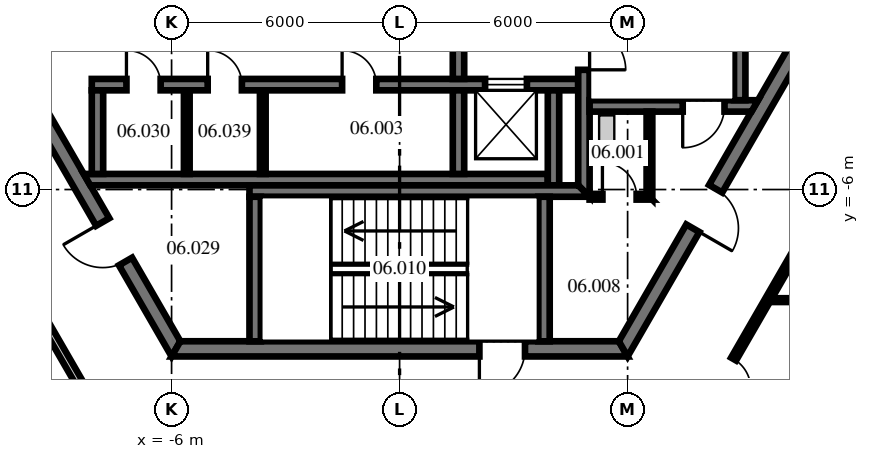
"""IFC4 building model, lengths in metres.
Left out: names, types, materials, properties, quantities, classifications, styles, units other than length and angle.
Written with IfcOpenShell. Run it as: python <this file> out.ifc"""

import sys

from ifc_helpers import new_model, si_unit, direction, frame, frame_2d, origin, place, context, subcontext, project, spatial, polyline, rectangle, outline, extrude, source, transform, mapped, element, fill, save


model = new_model("IFC4")
c1 = context("Model", 3, precision=1e-05, world=origin(), true_north=direction((0.0, 1.0)))
c2 = subcontext(c1, "Body", "Model", "MODEL_VIEW")
j1 = project(units=[si_unit("LENGTHUNIT", "METRE"), si_unit("PLANEANGLEUNIT", "RADIAN")], contexts=[c1])
p1 = place(None, origin())
s1 = spatial("IfcSite", under=j1, at=p1, CompositionType="ELEMENT")
p2 = place(p1, origin())
s2 = spatial("IfcBuilding", under=s1, at=p2, CompositionType="ELEMENT")
p3 = place(p2, frame((0.0, 0.0, 28.9)))
s3 = spatial("IfcBuildingStorey", under=s2, at=p3, CompositionType="ELEMENT", Elevation=28.9)
m1 = source(origin(), c2, "Body", "SweptSolid", [
    extrude(outline(polyline([(-0.115, -0.2), (11.885, -0.2), (11.654, 0.2), (0.115, 0.2), (-0.115, -0.2)])), origin(), (0.0, 0.0, 1.0), 4.1),
])
p4 = place(p3, frame((-11.769, 0.0, 0.0), z_axis=(0.0, 0.0, 1.0), x_axis=(0.499996592174, -0.866027371285, 0.0)))
e1 = element("IfcWall", 1, at=p4, inside=s3, PredefinedType="SHEAR", context=c2, shape_type="MappedRepresentation", body=[
    mapped(m1, transform((0.0, 0.0, 0.0), scale=1.0)),
])
p5 = place(p4, frame((1.405, 0.0, 0.0)))
e2 = element("IfcOpeningElement", 2, at=p5, cuts=e1, PredefinedType="OPENING", context=c2, shape_type="SweptSolid", body=[
    extrude(rectangle(XDim=1.8, YDim=2.1, at=frame_2d((0.9, 1.05))), frame((0.0, 0.21, 0.0), z_axis=(0.0, -1.0, 0.0), x_axis=(1.0, 0.0, 0.0)), (0.0, 0.0, 1.0), 0.42),
])
p6 = place(p4, frame((7.915, 0.0, 0.0)))
e3 = element("IfcOpeningElement", 3, at=p6, cuts=e1, PredefinedType="OPENING", context=c2, shape_type="SweptSolid", body=[
    extrude(rectangle(XDim=1.2, YDim=2.1, at=frame_2d((0.6, 1.05))), frame((0.0, 0.21, 0.0), z_axis=(0.0, -1.0, 0.0), x_axis=(1.0, 0.0, 0.0)), (0.0, 0.0, 1.0), 0.42),
])
p7 = place(p3, frame((-5.885, -10.192, 0.0), z_axis=(0.0, 0.0, 1.0), x_axis=(1.0, 0.0, 0.0)))
e4 = element("IfcWall", 4, at=p7, inside=s3, PredefinedType="SHEAR", context=c2, shape_type="MappedRepresentation", body=[
    mapped(m1, transform((0.0, 0.0, 0.0), scale=1.0)),
])
p8 = place(p7, frame((7.985, 0.0, 0.0)))
e5 = element("IfcOpeningElement", 5, at=p8, cuts=e4, PredefinedType="OPENING", context=c2, shape_type="SweptSolid", body=[
    extrude(rectangle(XDim=1.2, YDim=2.1, at=frame_2d((0.6, 1.05))), frame((0.0, 0.21, 0.0), z_axis=(0.0, -1.0, 0.0), x_axis=(1.0, 0.0, 0.0)), (0.0, 0.0, 1.0), 0.42),
])
p9 = place(p3, frame((5.885, -10.192, 0.0), z_axis=(0.0, 0.0, 1.0), x_axis=(0.499996592174, 0.866027371285, 0.0)))
e6 = element("IfcWall", 6, at=p9, inside=s3, PredefinedType="SHEAR", context=c2, shape_type="MappedRepresentation", body=[
    mapped(m1, transform((0.0, 0.0, 0.0), scale=1.0)),
])
p10 = place(p9, frame((3.665, 0.0, 0.0)))
e7 = element("IfcOpeningElement", 7, at=p10, cuts=e6, PredefinedType="OPENING", context=c2, shape_type="SweptSolid", body=[
    extrude(rectangle(XDim=1.2, YDim=2.1, at=frame_2d((0.6, 1.05))), frame((0.0, 0.21, 0.0), z_axis=(0.0, -1.0, 0.0), x_axis=(1.0, 0.0, 0.0)), (0.0, 0.0, 1.0), 0.42),
])
m2 = source(origin(), c2, "Body", "SweptSolid", [
    extrude(rectangle(XDim=12.8, YDim=0.3, at=frame_2d((6.4, 0.0))), origin(), (0.0, 0.0, 1.0), 4.1),
])
p11 = place(p3, frame((-8.1, -3.24, 0.0), z_axis=(0.0, 0.0, 1.0), x_axis=(1.0, 0.0, 0.0)))
e8 = element("IfcWall", 8, at=p11, inside=s3, PredefinedType="SHEAR", context=c2, shape_type="MappedRepresentation", body=[
    mapped(m2, transform((0.0, 0.0, 0.0), scale=1.0)),
])
p12 = place(p11, frame((0.913, 0.0, 0.0)))
e9 = element("IfcOpeningElement", 9, at=p12, cuts=e8, PredefinedType="OPENING", context=c2, shape_type="SweptSolid", body=[
    extrude(rectangle(XDim=0.9, YDim=2.1, at=frame_2d((0.45, 1.05))), frame((0.0, 0.16, 0.0), z_axis=(0.0, -1.0, 0.0), x_axis=(1.0, 0.0, 0.0)), (0.0, 0.0, 1.0), 0.32),
])
p13 = place(p11, frame((3.05, 0.0, 0.0)))
e10 = element("IfcOpeningElement", 10, at=p13, cuts=e8, PredefinedType="OPENING", context=c2, shape_type="SweptSolid", body=[
    extrude(rectangle(XDim=0.9, YDim=2.1, at=frame_2d((0.45, 1.05))), frame((0.0, 0.16, 0.0), z_axis=(0.0, -1.0, 0.0), x_axis=(1.0, 0.0, 0.0)), (0.0, 0.0, 1.0), 0.32),
])
p14 = place(p11, frame((6.587, 0.0, 0.0)))
e11 = element("IfcOpeningElement", 11, at=p14, cuts=e8, PredefinedType="OPENING", context=c2, shape_type="SweptSolid", body=[
    extrude(rectangle(XDim=0.9, YDim=2.1, at=frame_2d((0.45, 1.05))), frame((0.0, 0.16, 0.0), z_axis=(0.0, -1.0, 0.0), x_axis=(1.0, 0.0, 0.0)), (0.0, 0.0, 1.0), 0.32),
])
p15 = place(p11, frame((10.35, 0.0, 0.0)))
e12 = element("IfcOpeningElement", 12, at=p15, cuts=e8, PredefinedType="OPENING", context=c2, shape_type="SweptSolid", body=[
    extrude(rectangle(XDim=1.1, YDim=2.1, at=frame_2d((0.55, 1.05))), frame((0.0, 0.16, 0.0), z_axis=(0.0, -1.0, 0.0), x_axis=(1.0, 0.0, 0.0)), (0.0, 0.0, 1.0), 0.32),
])
m3 = source(origin(), c2, "Body", "SweptSolid", [
    extrude(outline(polyline([(12.0, -0.15), (-0.04, -0.15), (-0.213, 0.15), (12.0, 0.15), (12.0, -0.15)])), origin(), (0.0, 0.0, 1.0), 4.1),
])
p16 = place(p3, frame((-8.1, -5.74, 0.0), z_axis=(0.0, 0.0, 1.0), x_axis=(1.0, 0.0, 0.0)))
e13 = element("IfcWall", 13, at=p16, inside=s3, PredefinedType="SHEAR", context=c2, shape_type="MappedRepresentation", body=[
    mapped(m3, transform((0.0, 0.0, 0.0), scale=1.0)),
])
m4 = source(origin(), c2, "Body", "SweptSolid", [
    extrude(rectangle(XDim=2.2, YDim=0.3, at=frame_2d((1.1, 0.0))), origin(), (0.0, 0.0, 1.0), 4.1),
])
for number, where, z_axis, x_axis in (
    (14, (-7.95, -5.59, 0.0), (0.0, 0.0, 1.0), (0.0, 1.0, 0.0)),
    (15, (1.55, -5.59, 0.0), (0.0, 0.0, 1.0), (0.0, 1.0, 0.0)),
):
    element("IfcWall", number, at=place(p3, frame(where, z_axis=z_axis, x_axis=x_axis)), inside=s3, PredefinedType="SHEAR", context=c2, shape_type="MappedRepresentation", body=[
        mapped(m4, transform((0.0, 0.0, 0.0), scale=1.0)),
    ])
m5 = source(origin(), c2, "Body", "SweptSolid", [
    extrude(rectangle(XDim=2.5, YDim=0.3, at=frame_2d((1.25, 0.0))), origin(), (0.0, 0.0, 1.0), 4.1),
])
p17 = place(p3, frame((4.05, -5.89, 0.0), z_axis=(0.0, 0.0, 1.0), x_axis=(0.0, 1.0, 0.0)))
e16 = element("IfcWall", 16, at=p17, inside=s3, PredefinedType="SHEAR", context=c2, shape_type="MappedRepresentation", body=[
    mapped(m5, transform((0.0, 0.0, 0.0), scale=1.0)),
])
m6 = source(origin(), c2, "Body", "SweptSolid", [
    extrude(rectangle(XDim=3.0, YDim=0.3, at=frame_2d((1.5, 0.0))), origin(), (0.0, 0.0, 1.0), 4.1),
])
p18 = place(p3, frame((1.55, -3.09, 0.0), z_axis=(0.0, 0.0, 1.0), x_axis=(0.0, 1.0, 0.0)))
e17 = element("IfcWall", 17, at=p18, inside=s3, PredefinedType="SHEAR", context=c2, shape_type="MappedRepresentation", body=[
    mapped(m6, transform((0.0, 0.0, 0.0), scale=1.0)),
])
p19 = place(p18, frame((0.9, 0.0, 0.0)))
e18 = element("IfcOpeningElement", 18, at=p19, cuts=e17, PredefinedType="OPENING", context=c2, shape_type="SweptSolid", body=[
    extrude(rectangle(XDim=1.2, YDim=2.1, at=frame_2d((0.6, 1.05))), frame((0.0, 0.16, 0.0), z_axis=(0.0, -1.0, 0.0), x_axis=(1.0, 0.0, 0.0)), (0.0, 0.0, 1.0), 0.32),
])
m7 = source(origin(), c2, "Body", "SweptSolid", [
    extrude(outline(polyline([(-0.15, -0.15), (9.99, -0.15), (9.99, 0.15), (0.15, 0.15), (-0.15, -0.15)])), origin(), (0.0, 0.0, 1.0), 4.1),
])
p20 = place(p3, frame((4.85, -6.04, 0.0), z_axis=(0.0, 0.0, 1.0), x_axis=(0.0, 1.0, 0.0)))
e19 = element("IfcWall", 19, at=p20, inside=s3, PredefinedType="SHEAR", context=c2, shape_type="MappedRepresentation", body=[
    mapped(m7, transform((0.0, 0.0, 0.0), scale=1.0)),
])
p21 = place(p20, frame((3.19, 0.0, 0.0)))
e20 = element("IfcOpeningElement", 20, at=p21, cuts=e19, PredefinedType="OPENING", context=c2, shape_type="SweptSolid", body=[
    extrude(rectangle(XDim=1.1, YDim=2.1, at=frame_2d((0.55, 1.05))), frame((0.0, 0.16, 0.0), z_axis=(0.0, -1.0, 0.0), x_axis=(1.0, 0.0, 0.0)), (0.0, 0.0, 1.0), 0.32),
])
m8 = source(origin(), c2, "Body", "SweptSolid", [
    extrude(outline(polyline([(0.0, -0.15), (0.0, 0.15), (4.433, 0.15), (4.26, -0.15), (0.0, -0.15)])), origin(), (0.0, 0.0, 1.0), 4.1),
])
p22 = place(p3, frame((5.0, -3.8, 0.0), z_axis=(0.0, 0.0, 1.0), x_axis=(1.0, 0.0, 0.0)))
e21 = element("IfcWall", 21, at=p22, inside=s3, PredefinedType="SHEAR", context=c2, shape_type="MappedRepresentation", body=[
    mapped(m8, transform((0.0, 0.0, 0.0), scale=1.0)),
])
p23 = place(p22, frame((2.45, 0.0, 0.0)))
e22 = element("IfcOpeningElement", 22, at=p23, cuts=e21, PredefinedType="OPENING", context=c2, shape_type="SweptSolid", body=[
    extrude(rectangle(XDim=1.1, YDim=2.1, at=frame_2d((0.55, 1.05))), frame((0.0, 0.16, 0.0), z_axis=(0.0, -1.0, 0.0), x_axis=(1.0, 0.0, 0.0)), (0.0, 0.0, 1.0), 0.32),
])
m9 = source(origin(), c2, "Body", "SweptSolid", [
    extrude(rectangle(XDim=7.3, YDim=0.3, at=frame_2d((3.65, 0.0))), origin(), (0.0, 0.0, 1.0), 4.1),
])
p24 = place(p3, frame((8.95, -3.65, 0.0), z_axis=(0.0, 0.0, 1.0), x_axis=(0.0, 1.0, 0.0)))
e23 = element("IfcWall", 23, at=p24, inside=s3, PredefinedType="SHEAR", context=c2, shape_type="MappedRepresentation", body=[
    mapped(m9, transform((0.0, 0.0, 0.0), scale=1.0)),
])
m10 = source(origin(), c2, "Body", "SweptSolid", [
    extrude(outline(polyline([(0.0, -0.15), (8.95, -0.15), (8.65, 0.15), (0.0, 0.15), (0.0, -0.15)])), origin(), (0.0, 0.0, 1.0), 4.1),
])
p25 = place(p3, frame((-3.95, -6.04, 0.0), z_axis=(0.0, 0.0, 1.0), x_axis=(1.0, 0.0, 0.0)))
e24 = element("IfcWall", 24, at=p25, inside=s3, PredefinedType="SHEAR", context=c2, shape_type="MappedRepresentation", body=[
    mapped(m10, transform((0.0, 0.0, 0.0), scale=1.0)),
])
m11 = source(origin(), c2, "Body", "SweptSolid", [
    extrude(outline(polyline([(3.8, -0.15), (-0.004, -0.15), (-0.004, 0.15), (3.8, 0.15), (3.8, -0.15)])), origin(), (0.0, 0.0, 1.0), 4.1),
])
for number, where, z_axis, x_axis in (
    (25, (-3.8, -9.99, 0.0), (0.0, 0.0, 1.0), (0.0, 1.0, 0.0)),
    (26, (3.8, -9.99, 0.0), (0.0, 0.0, 1.0), (0.0, 1.0, 0.0)),
):
    element("IfcWall", number, at=place(p3, frame(where, z_axis=z_axis, x_axis=x_axis)), inside=s3, PredefinedType="SHEAR", context=c2, shape_type="MappedRepresentation", body=[
        mapped(m11, transform((0.0, 0.0, 0.0), scale=1.0)),
    ])
m12 = source(origin(), c2, "Body", "SweptSolid", [
    extrude(outline(polyline([(0.0, -0.075), (1.65, -0.075), (1.5, 0.075), (0.0, 0.075), (0.0, -0.075)])), origin(), (0.0, 0.0, 1.0), 4.1),
])
p26 = place(p3, frame((5.0, -6.19, 0.0), z_axis=(0.0, 0.0, 1.0), x_axis=(1.0, 0.0, 0.0)))
e27 = element("IfcWall", 27, at=p26, inside=s3, PredefinedType="PARTITIONING", context=c2, shape_type="MappedRepresentation", body=[
    mapped(m12, transform((0.0, 0.0, 0.0), scale=1.0)),
])
p27 = place(p26, frame((0.337, 0.0, 0.0)))
e28 = element("IfcOpeningElement", 28, at=p27, cuts=e27, PredefinedType="OPENING", context=c2, shape_type="SweptSolid", body=[
    extrude(rectangle(XDim=0.9, YDim=2.1, at=frame_2d((0.45, 1.05))), frame((0.0, 0.085, 0.0), z_axis=(0.0, -1.0, 0.0), x_axis=(1.0, 0.0, 0.0)), (0.0, 0.0, 1.0), 0.17),
])
m13 = source(origin(), c2, "Body", "SweptSolid", [
    extrude(outline(polyline([(-0.075, -0.075), (2.24, -0.075), (2.24, 0.075), (0.075, 0.075), (-0.075, -0.075)])), origin(), (0.0, 0.0, 1.0), 4.1),
])
p28 = place(p3, frame((6.575, -6.19, 0.0), z_axis=(0.0, 0.0, 1.0), x_axis=(0.0, 1.0, 0.0)))
e29 = element("IfcWall", 29, at=p28, inside=s3, PredefinedType="PARTITIONING", context=c2, shape_type="MappedRepresentation", body=[
    mapped(m13, transform((0.0, 0.0, 0.0), scale=1.0)),
])
m14 = source(origin(), c2, "Body", "SweptSolid", [
    extrude(rectangle(XDim=2.2, YDim=0.15, at=frame_2d((1.1, 0.0))), origin(), (0.0, 0.0, 1.0), 4.1),
])
for number, where, z_axis, x_axis in (
    (30, (-5.6, -5.59, 0.0), (0.0, 0.0, 1.0), (0.0, 1.0, 0.0)),
    (31, (-3.6, -5.59, 0.0), (0.0, 0.0, 1.0), (0.0, 1.0, 0.0)),
):
    element("IfcWall", number, at=place(p3, frame(where, z_axis=z_axis, x_axis=x_axis)), inside=s3, PredefinedType="PARTITIONING", context=c2, shape_type="MappedRepresentation", body=[
        mapped(m14, transform((0.0, 0.0, 0.0), scale=1.0)),
    ])
m15 = source(origin(), c2, "Body", "SweptSolid", [
    extrude(rectangle(XDim=8.478, YDim=0.2, at=frame_2d((4.239, 0.0))), origin(), (0.0, 0.0, 1.0), 4.1),
])
p29 = place(p3, frame((-11.673, -5.466, 0.0), z_axis=(0.0, 0.0, 1.0), x_axis=(0.499985860718, -0.866033566949, 0.0)))
e32 = element("IfcWall", 32, at=p29, inside=s3, PredefinedType="PARTITIONING", context=c2, shape_type="MappedRepresentation", body=[
    mapped(m15, transform((0.0, 0.0, 0.0), scale=1.0)),
])
m16 = source(origin(), c2, "Body", "SweptSolid", [
    extrude(rectangle(XDim=11.802, YDim=0.1, at=frame_2d((5.901, 0.0))), origin(), (0.0, 0.0, 1.0), 3.343),
])
p30 = place(p3, frame((9.685, -8.91, 0.0), z_axis=(0.0, 0.0, 1.0), x_axis=(1.0, 0.0, 0.0)))
e33 = element("IfcWall", 33, at=p30, inside=s3, PredefinedType="PARTITIONING", context=c2, shape_type="MappedRepresentation", body=[
    mapped(m16, transform((0.0, 0.0, 0.0), scale=1.0)),
])
m17 = source(origin(), c2, "Body", "SweptSolid", [
    extrude(rectangle(XDim=8.468, YDim=0.15, at=frame_2d((4.234, 0.0))), origin(), (0.0, 0.0, 1.0), 4.1),
])
p31 = place(p3, frame((7.449, -12.782, 0.0), z_axis=(0.0, 0.0, 1.0), x_axis=(0.499990325971, 0.866030989016, 0.0)))
e34 = element("IfcWall", 34, at=p31, inside=s3, PredefinedType="PARTITIONING", context=c2, shape_type="MappedRepresentation", body=[
    mapped(m17, transform((0.0, 0.0, 0.0), scale=1.0)),
])
p32 = place(p31, frame((1.78, 0.0, 0.0)))
e35 = element("IfcOpeningElement", 35, at=p32, cuts=e34, PredefinedType="OPENING", context=c2, shape_type="SweptSolid", body=[
    extrude(rectangle(XDim=0.9, YDim=2.1, at=frame_2d((0.45, 1.05))), frame((0.0, 0.085, 0.0), z_axis=(0.0, -1.0, 0.0), x_axis=(1.0, 0.0, 0.0)), (0.0, 0.0, 1.0), 0.17),
])
p33 = place(p8, frame((1.2, 0.0, 0.0), z_axis=(0.0, 0.0, 1.0), x_axis=(-1.0, 0.0, 0.0)))
e36 = element("IfcDoor", 36, at=p33, inside=s3, OperationType="SINGLE_SWING_RIGHT", PredefinedType="DOOR", context=c2, shape_type="SweptSolid", body=[
    extrude(rectangle(XDim=1.2, YDim=2.1, at=frame_2d((0.6, 1.05))), frame((0.0, 0.025, 0.0), z_axis=(0.0, -1.0, 0.0), x_axis=(1.0, 0.0, 0.0)), (0.0, 0.0, 1.0), 0.05),
])
fill(e5, e36)
p34 = place(p10, frame((1.2, 0.0, 0.0), z_axis=(0.0, 0.0, 1.0), x_axis=(-1.0, 0.0, 0.0)))
e37 = element("IfcDoor", 37, at=p34, inside=s3, OperationType="SINGLE_SWING_RIGHT", PredefinedType="DOOR", context=c2, shape_type="SweptSolid", body=[
    extrude(rectangle(XDim=1.2, YDim=2.1, at=frame_2d((0.6, 1.05))), frame((0.0, 0.025, 0.0), z_axis=(0.0, -1.0, 0.0), x_axis=(1.0, 0.0, 0.0)), (0.0, 0.0, 1.0), 0.05),
])
fill(e7, e37)
p35 = place(p6, frame((1.2, 0.0, 0.0), z_axis=(0.0, 0.0, 1.0), x_axis=(-1.0, 0.0, 0.0)))
e38 = element("IfcDoor", 38, at=p35, inside=s3, OperationType="SINGLE_SWING_RIGHT", PredefinedType="DOOR", context=c2, shape_type="SweptSolid", body=[
    extrude(rectangle(XDim=1.2, YDim=2.1, at=frame_2d((0.6, 1.05))), frame((0.0, 0.025, 0.0), z_axis=(0.0, -1.0, 0.0), x_axis=(1.0, 0.0, 0.0)), (0.0, 0.0, 1.0), 0.05),
])
fill(e3, e38)
p36 = place(p21, frame((1.1, 0.0, 0.0), z_axis=(0.0, 0.0, 1.0), x_axis=(-1.0, 0.0, 0.0)))
e39 = element("IfcDoor", 39, at=p36, inside=s3, OperationType="SINGLE_SWING_RIGHT", PredefinedType="DOOR", context=c2, shape_type="SweptSolid", body=[
    extrude(rectangle(XDim=1.1, YDim=2.1, at=frame_2d((0.55, 1.05))), frame((0.0, 0.025, 0.0), z_axis=(0.0, -1.0, 0.0), x_axis=(1.0, 0.0, 0.0)), (0.0, 0.0, 1.0), 0.05),
])
fill(e20, e39)
p37 = place(p23, frame((1.1, 0.0, 0.0), z_axis=(0.0, 0.0, 1.0), x_axis=(-1.0, 0.0, 0.0)))
e40 = element("IfcDoor", 40, at=p37, inside=s3, OperationType="SINGLE_SWING_RIGHT", PredefinedType="DOOR", context=c2, shape_type="SweptSolid", body=[
    extrude(rectangle(XDim=1.1, YDim=2.1, at=frame_2d((0.55, 1.05))), frame((0.0, 0.025, 0.0), z_axis=(0.0, -1.0, 0.0), x_axis=(1.0, 0.0, 0.0)), (0.0, 0.0, 1.0), 0.05),
])
fill(e22, e40)
p38 = place(p27, origin())
e41 = element("IfcDoor", 41, at=p38, inside=s3, OperationType="SINGLE_SWING_LEFT", PredefinedType="DOOR", context=c2, shape_type="SweptSolid", body=[
    extrude(rectangle(XDim=0.9, YDim=2.1, at=frame_2d((0.45, 1.05))), frame((0.0, 0.025, 0.0), z_axis=(0.0, -1.0, 0.0), x_axis=(1.0, 0.0, 0.0)), (0.0, 0.0, 1.0), 0.05),
])
fill(e28, e41)
p39 = place(p12, origin())
e42 = element("IfcDoor", 42, at=p39, inside=s3, OperationType="SINGLE_SWING_LEFT", PredefinedType="DOOR", context=c2, shape_type="SweptSolid", body=[
    extrude(rectangle(XDim=0.9, YDim=2.1, at=frame_2d((0.45, 1.05))), frame((0.0, 0.025, 0.0), z_axis=(0.0, -1.0, 0.0), x_axis=(1.0, 0.0, 0.0)), (0.0, 0.0, 1.0), 0.05),
])
fill(e9, e42)
p40 = place(p13, origin())
e43 = element("IfcDoor", 43, at=p40, inside=s3, OperationType="SINGLE_SWING_LEFT", PredefinedType="DOOR", context=c2, shape_type="SweptSolid", body=[
    extrude(rectangle(XDim=0.9, YDim=2.1, at=frame_2d((0.45, 1.05))), frame((0.0, 0.025, 0.0), z_axis=(0.0, -1.0, 0.0), x_axis=(1.0, 0.0, 0.0)), (0.0, 0.0, 1.0), 0.05),
])
fill(e10, e43)
p41 = place(p14, origin())
e44 = element("IfcDoor", 44, at=p41, inside=s3, OperationType="SINGLE_SWING_LEFT", PredefinedType="DOOR", context=c2, shape_type="SweptSolid", body=[
    extrude(rectangle(XDim=0.9, YDim=2.1, at=frame_2d((0.45, 1.05))), frame((0.0, 0.025, 0.0), z_axis=(0.0, -1.0, 0.0), x_axis=(1.0, 0.0, 0.0)), (0.0, 0.0, 1.0), 0.05),
])
fill(e11, e44)
p42 = place(p15, origin())
e45 = element("IfcDoor", 45, at=p42, inside=s3, OperationType="DOUBLE_DOOR_SLIDING", PredefinedType="DOOR", context=c2, shape_type="SweptSolid", body=[
    extrude(rectangle(XDim=1.1, YDim=2.1, at=frame_2d((0.55, 1.05))), frame((0.0, 0.025, 0.0), z_axis=(0.0, -1.0, 0.0), x_axis=(1.0, 0.0, 0.0)), (0.0, 0.0, 1.0), 0.05),
])
fill(e12, e45)
p43 = place(p32, origin())
e46 = element("IfcDoor", 46, at=p43, inside=s3, OperationType="SINGLE_SWING_RIGHT", PredefinedType="DOOR", context=c2, shape_type="SweptSolid", body=[
    extrude(rectangle(XDim=0.9, YDim=2.1, at=frame_2d((0.45, 1.05))), frame((0.0, 0.025, 0.0), z_axis=(0.0, -1.0, 0.0), x_axis=(1.0, 0.0, 0.0)), (0.0, 0.0, 1.0), 0.05),
])
fill(e35, e46)
save(model, sys.argv[1])
